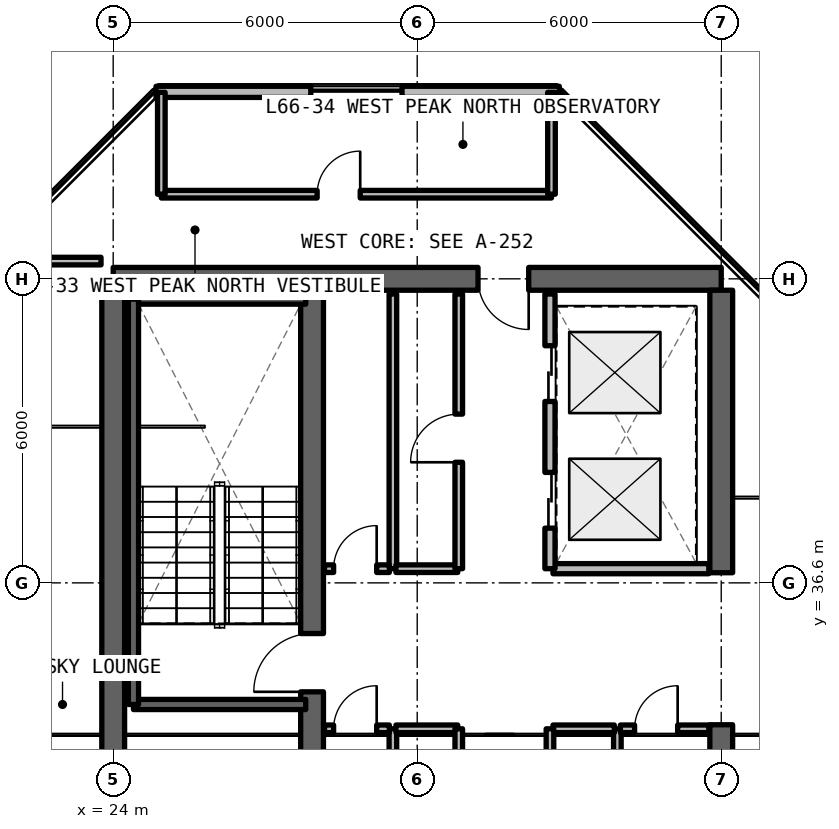
"""IFC4 building model, lengths in metres.
Left out: names, types, materials, properties, quantities, classifications, styles, units other than length and angle.
Written with IfcOpenShell. Run it as: python <this file> out.ifc"""

import sys

from ifc_helpers import new_model, si_unit, direction, frame, frame_2d, origin, place, context, subcontext, project, spatial, rectangle, extrude, element, fill, save


model = new_model("IFC4")
c1 = context("Model", 3, precision=1e-05, world=origin(), true_north=direction((0.0, 1.0)))
c2 = subcontext(c1, "Body", "Model", "MODEL_VIEW")
j1 = project(units=[si_unit("LENGTHUNIT", "METRE"), si_unit("PLANEANGLEUNIT", "RADIAN")], contexts=[c1])
p1 = place(None, origin())
s1 = spatial("IfcSite", under=j1, at=p1, CompositionType="ELEMENT")
p2 = place(p1, origin())
s2 = spatial("IfcBuilding", under=s1, at=p2, CompositionType="ELEMENT")
p3 = place(p2, frame((0.0, 0.0, 235.95)))
s3 = spatial("IfcBuildingStorey", under=s2, at=p3, CompositionType="ELEMENT", Elevation=235.95)
p4 = place(p3, frame((36.0, 42.6, 0.0), z_axis=(0.0, 0.0, 1.0), x_axis=(-1.0, 0.0, 0.0)))
e1 = element("IfcWall", 1, at=p4, inside=s3, PredefinedType="SHEAR", context=c2, shape_type="SweptSolid", body=[
    extrude(rectangle(XDim=12.0, YDim=0.45, at=frame_2d((6.0, 0.0))), origin(), (0.0, 0.0, 1.0), 3.3),
])
p5 = place(p4, frame((3.8, 0.0, 0.0)))
e2 = element("IfcOpeningElement", 2, at=p5, cuts=e1, PredefinedType="OPENING", context=c2, shape_type="SweptSolid", body=[
    extrude(rectangle(XDim=1.0, YDim=2.15, at=frame_2d((0.5, 1.075))), frame((0.0, 0.235, 0.0), z_axis=(0.0, -1.0, 0.0), x_axis=(1.0, 0.0, 0.0)), (0.0, 0.0, 1.0), 0.47),
])
p6 = place(p3, frame((24.0, 24.825, 0.0), z_axis=(0.0, 0.0, 1.0), x_axis=(0.0, 1.0, 0.0)))
e3 = element("IfcWall", 3, at=p6, inside=s3, PredefinedType="SHEAR", context=c2, shape_type="SweptSolid", body=[
    extrude(rectangle(XDim=17.55, YDim=0.45, at=frame_2d((8.775, 0.0))), origin(), (0.0, 0.0, 1.0), 3.3),
])
p7 = place(p3, frame((36.0, 24.825, 0.0), z_axis=(0.0, 0.0, 1.0), x_axis=(0.0, 1.0, 0.0)))
e4 = element("IfcWall", 4, at=p7, inside=s3, PredefinedType="SHEAR", context=c2, shape_type="SweptSolid", body=[
    extrude(rectangle(XDim=8.975, YDim=0.45, at=frame_2d((4.488, 0.0))), origin(), (0.0, 0.0, 1.0), 3.3),
])
p8 = place(p3, frame((36.0, 36.8, 0.0), z_axis=(0.0, 0.0, 1.0), x_axis=(0.0, 1.0, 0.0)))
e5 = element("IfcWall", 5, at=p8, inside=s3, PredefinedType="SHEAR", context=c2, shape_type="SweptSolid", body=[
    extrude(rectangle(XDim=5.575, YDim=0.45, at=frame_2d((2.788, 0.0))), origin(), (0.0, 0.0, 1.0), 3.3),
])
p9 = place(p3, frame((27.925, 24.825, 0.0), z_axis=(0.0, 0.0, 1.0), x_axis=(0.0, 1.0, 0.0)))
e6 = element("IfcWall", 6, at=p9, inside=s3, PredefinedType="SHEAR", context=c2, shape_type="SweptSolid", body=[
    extrude(rectangle(XDim=17.55, YDim=0.45, at=frame_2d((8.775, 0.0))), origin(), (0.0, 0.0, 1.0), 3.3),
])
p10 = place(p9, frame((0.425, 0.0, 0.0)))
e7 = element("IfcOpeningElement", 7, at=p10, cuts=e6, PredefinedType="OPENING", context=c2, shape_type="SweptSolid", body=[
    extrude(rectangle(XDim=1.15, YDim=2.15, at=frame_2d((0.575, 1.075))), frame((0.0, 0.235, 0.0), z_axis=(0.0, -1.0, 0.0), x_axis=(1.0, 0.0, 0.0)), (0.0, 0.0, 1.0), 0.47),
])
p11 = place(p9, frame((9.625, 0.0, 0.0)))
e8 = element("IfcOpeningElement", 8, at=p11, cuts=e6, PredefinedType="OPENING", context=c2, shape_type="SweptSolid", body=[
    extrude(rectangle(XDim=1.15, YDim=2.15, at=frame_2d((0.575, 1.075))), frame((0.0, 0.235, 0.0), z_axis=(0.0, -1.0, 0.0), x_axis=(1.0, 0.0, 0.0)), (0.0, 0.0, 1.0), 0.47),
])
p12 = place(p3, frame((32.804, 46.29, 0.0), z_axis=(0.0, 0.0, 1.0), x_axis=(-1.0, 0.0, 0.0)))
e9 = element("IfcWall", 9, at=p12, inside=s3, PredefinedType="SOLIDWALL", context=c2, shape_type="SweptSolid", body=[
    extrude(rectangle(XDim=7.959, YDim=0.22, at=frame_2d((3.979, 0.0))), origin(), (0.0, 0.0, 1.0), 3.08),
])
p13 = place(p12, frame((3.104, 0.0, 0.78)))
e10 = element("IfcOpeningElement", 10, at=p13, cuts=e9, PredefinedType="OPENING", context=c2, shape_type="SweptSolid", body=[
    extrude(rectangle(XDim=1.8, YDim=1.66, at=frame_2d((0.9, 0.83))), frame((0.0, 0.12, 0.0), z_axis=(0.0, -1.0, 0.0), x_axis=(1.0, 0.0, 0.0)), (0.0, 0.0, 1.0), 0.24),
])
p14 = place(p3, frame((29.52, 28.5, 0.0), z_axis=(0.0, 0.0, 1.0), x_axis=(0.0, 1.0, 0.0)))
e11 = element("IfcWall", 11, at=p14, inside=s3, PredefinedType="SOLIDWALL", context=c2, shape_type="SweptSolid", body=[
    extrude(rectangle(XDim=5.22, YDim=0.15, at=frame_2d((2.61, 0.0))), origin(), (0.0, 0.0, 1.0), 2.35),
])
p15 = place(p3, frame((28.17, 33.72, 0.0), z_axis=(0.0, 0.0, 1.0), x_axis=(1.0, 0.0, 0.0)))
e12 = element("IfcWall", 12, at=p15, inside=s3, PredefinedType="SOLIDWALL", context=c2, shape_type="SweptSolid", body=[
    extrude(rectangle(XDim=1.28, YDim=0.15, at=frame_2d((0.64, 0.0))), origin(), (0.0, 0.0, 1.0), 2.35),
])
p16 = place(p15, frame((0.18, 0.0, 0.0)))
e13 = element("IfcOpeningElement", 13, at=p16, cuts=e12, PredefinedType="OPENING", context=c2, shape_type="SweptSolid", body=[
    extrude(rectangle(XDim=0.85, YDim=2.1, at=frame_2d((0.425, 1.05))), frame((0.0, 0.085, 0.0), z_axis=(0.0, -1.0, 0.0), x_axis=(1.0, 0.0, 0.0)), (0.0, 0.0, 1.0), 0.17),
])
p17 = place(p3, frame((29.58, 33.72, 0.0), z_axis=(0.0, 0.0, 1.0), x_axis=(1.0, 0.0, 0.0)))
e14 = element("IfcWall", 14, at=p17, inside=s3, PredefinedType="SOLIDWALL", context=c2, shape_type="SweptSolid", body=[
    extrude(rectangle(XDim=1.22, YDim=0.15, at=frame_2d((0.61, 0.0))), origin(), (0.0, 0.0, 1.0), 2.35),
])
p18 = place(p3, frame((30.82, 28.5, 0.0), z_axis=(0.0, 0.0, 1.0), x_axis=(0.0, 1.0, 0.0)))
e15 = element("IfcWall", 15, at=p18, inside=s3, PredefinedType="SOLIDWALL", context=c2, shape_type="SweptSolid", body=[
    extrude(rectangle(XDim=5.22, YDim=0.15, at=frame_2d((2.61, 0.0))), origin(), (0.0, 0.0, 1.0), 2.35),
])
p19 = place(p18, frame((2.0, 0.0, 0.0)))
e16 = element("IfcOpeningElement", 16, at=p19, cuts=e15, PredefinedType="OPENING", context=c2, shape_type="SweptSolid", body=[
    extrude(rectangle(XDim=0.95, YDim=2.15, at=frame_2d((0.475, 1.075))), frame((0.0, 0.085, 0.0), z_axis=(0.0, -1.0, 0.0), x_axis=(1.0, 0.0, 0.0)), (0.0, 0.0, 1.0), 0.17),
])
p20 = place(p3, frame((33.95, 28.5, 0.0), z_axis=(0.0, 0.0, 1.0), x_axis=(0.0, 1.0, 0.0)))
e17 = element("IfcWall", 17, at=p20, inside=s3, PredefinedType="SOLIDWALL", context=c2, shape_type="SweptSolid", body=[
    extrude(rectangle(XDim=5.22, YDim=0.15, at=frame_2d((2.61, 0.0))), origin(), (0.0, 0.0, 1.0), 2.35),
])
p21 = place(p3, frame((32.68, 33.72, 0.0), z_axis=(0.0, 0.0, 1.0), x_axis=(1.0, 0.0, 0.0)))
e18 = element("IfcWall", 18, at=p21, inside=s3, PredefinedType="SOLIDWALL", context=c2, shape_type="SweptSolid", body=[
    extrude(rectangle(XDim=1.21, YDim=0.15, at=frame_2d((0.605, 0.0))), origin(), (0.0, 0.0, 1.0), 2.35),
])
p22 = place(p3, frame((34.01, 33.72, 0.0), z_axis=(0.0, 0.0, 1.0), x_axis=(1.0, 0.0, 0.0)))
e19 = element("IfcWall", 19, at=p22, inside=s3, PredefinedType="SOLIDWALL", context=c2, shape_type="SweptSolid", body=[
    extrude(rectangle(XDim=1.745, YDim=0.15, at=frame_2d((0.873, 0.0))), origin(), (0.0, 0.0, 1.0), 2.35),
])
p23 = place(p22, frame((0.28, 0.0, 0.0)))
e20 = element("IfcOpeningElement", 20, at=p23, cuts=e19, PredefinedType="OPENING", context=c2, shape_type="SweptSolid", body=[
    extrude(rectangle(XDim=0.85, YDim=2.1, at=frame_2d((0.425, 1.05))), frame((0.0, 0.085, 0.0), z_axis=(0.0, -1.0, 0.0), x_axis=(1.0, 0.0, 0.0)), (0.0, 0.0, 1.0), 0.17),
])
p24 = place(p3, frame((32.62, 28.5, 0.0), z_axis=(0.0, 0.0, 1.0), x_axis=(0.0, 1.0, 0.0)))
e21 = element("IfcWall", 21, at=p24, inside=s3, PredefinedType="SOLIDWALL", context=c2, shape_type="SweptSolid", body=[
    extrude(rectangle(XDim=5.22, YDim=0.15, at=frame_2d((2.61, 0.0))), origin(), (0.0, 0.0, 1.0), 2.35),
])
p25 = place(p24, frame((2.0, 0.0, 0.0)))
e22 = element("IfcOpeningElement", 22, at=p25, cuts=e21, PredefinedType="OPENING", context=c2, shape_type="SweptSolid", body=[
    extrude(rectangle(XDim=0.95, YDim=2.15, at=frame_2d((0.475, 1.075))), frame((0.0, 0.085, 0.0), z_axis=(0.0, -1.0, 0.0), x_axis=(1.0, 0.0, 0.0)), (0.0, 0.0, 1.0), 0.17),
])
p26 = place(p3, frame((29.52, 36.88, 0.0), z_axis=(0.0, 0.0, 1.0), x_axis=(0.0, 1.0, 0.0)))
e23 = element("IfcWall", 23, at=p26, inside=s3, PredefinedType="SOLIDWALL", context=c2, shape_type="SweptSolid", body=[
    extrude(rectangle(XDim=5.42, YDim=0.15, at=frame_2d((2.71, 0.0))), origin(), (0.0, 0.0, 1.0), 2.35),
])
p27 = place(p3, frame((28.17, 36.88, 0.0), z_axis=(0.0, 0.0, 1.0), x_axis=(1.0, 0.0, 0.0)))
e24 = element("IfcWall", 24, at=p27, inside=s3, PredefinedType="SOLIDWALL", context=c2, shape_type="SweptSolid", body=[
    extrude(rectangle(XDim=1.28, YDim=0.15, at=frame_2d((0.64, 0.0))), origin(), (0.0, 0.0, 1.0), 2.35),
])
p28 = place(p27, frame((0.18, 0.0, 0.0)))
e25 = element("IfcOpeningElement", 25, at=p28, cuts=e24, PredefinedType="OPENING", context=c2, shape_type="SweptSolid", body=[
    extrude(rectangle(XDim=0.85, YDim=2.1, at=frame_2d((0.425, 1.05))), frame((0.0, 0.085, 0.0), z_axis=(0.0, -1.0, 0.0), x_axis=(1.0, 0.0, 0.0)), (0.0, 0.0, 1.0), 0.17),
])
p29 = place(p3, frame((29.58, 36.88, 0.0), z_axis=(0.0, 0.0, 1.0), x_axis=(1.0, 0.0, 0.0)))
e26 = element("IfcWall", 26, at=p29, inside=s3, PredefinedType="SOLIDWALL", context=c2, shape_type="SweptSolid", body=[
    extrude(rectangle(XDim=1.22, YDim=0.15, at=frame_2d((0.61, 0.0))), origin(), (0.0, 0.0, 1.0), 2.35),
])
p30 = place(p3, frame((30.82, 36.88, 0.0), z_axis=(0.0, 0.0, 1.0), x_axis=(0.0, 1.0, 0.0)))
e27 = element("IfcWall", 27, at=p30, inside=s3, PredefinedType="SOLIDWALL", context=c2, shape_type="SweptSolid", body=[
    extrude(rectangle(XDim=5.42, YDim=0.15, at=frame_2d((2.71, 0.0))), origin(), (0.0, 0.0, 1.0), 2.35),
])
p31 = place(p30, frame((2.1, 0.0, 0.0)))
e28 = element("IfcOpeningElement", 28, at=p31, cuts=e27, PredefinedType="OPENING", context=c2, shape_type="SweptSolid", body=[
    extrude(rectangle(XDim=0.95, YDim=2.15, at=frame_2d((0.475, 1.075))), frame((0.0, 0.085, 0.0), z_axis=(0.0, -1.0, 0.0), x_axis=(1.0, 0.0, 0.0)), (0.0, 0.0, 1.0), 0.17),
])
p32 = place(p3, frame((32.68, 36.88, 0.0), z_axis=(0.0, 0.0, 1.0), x_axis=(1.0, 0.0, 0.0)))
e29 = element("IfcWall", 29, at=p32, inside=s3, PredefinedType="SOLIDWALL", context=c2, shape_type="SweptSolid", body=[
    extrude(rectangle(XDim=3.075, YDim=0.2, at=frame_2d((1.538, 0.0))), origin(), (0.0, 0.0, 1.0), 2.35),
])
p33 = place(p3, frame((32.62, 36.88, 0.0), z_axis=(0.0, 0.0, 1.0), x_axis=(0.0, 1.0, 0.0)))
e30 = element("IfcWall", 30, at=p33, inside=s3, PredefinedType="SOLIDWALL", context=c2, shape_type="SweptSolid", body=[
    extrude(rectangle(XDim=5.42, YDim=0.2, at=frame_2d((2.71, 0.0))), origin(), (0.0, 0.0, 1.0), 2.35),
])
p34 = place(p33, frame((0.8, 0.0, 0.0)))
e31 = element("IfcOpeningElement", 31, at=p34, cuts=e30, PredefinedType="OPENING", context=c2, shape_type="SweptSolid", body=[
    extrude(rectangle(XDim=1.1, YDim=2.2, at=frame_2d((0.55, 1.1))), frame((0.0, 0.11, 0.0), z_axis=(0.0, -1.0, 0.0), x_axis=(1.0, 0.0, 0.0)), (0.0, 0.0, 1.0), 0.22),
])
p35 = place(p33, frame((3.3, 0.0, 0.0)))
e32 = element("IfcOpeningElement", 32, at=p35, cuts=e30, PredefinedType="OPENING", context=c2, shape_type="SweptSolid", body=[
    extrude(rectangle(XDim=1.1, YDim=2.2, at=frame_2d((0.55, 1.1))), frame((0.0, 0.11, 0.0), z_axis=(0.0, -1.0, 0.0), x_axis=(1.0, 0.0, 0.0)), (0.0, 0.0, 1.0), 0.22),
])
p36 = place(p3, frame((22.12, 42.95, 0.0), z_axis=(0.0, 0.0, 1.0), x_axis=(1.0, 0.0, 0.0)))
e33 = element("IfcWall", 33, at=p36, inside=s3, PredefinedType="SOLIDWALL", context=c2, shape_type="SweptSolid", body=[
    extrude(rectangle(XDim=1.64, YDim=0.15, at=frame_2d((0.82, 0.0))), origin(), (0.0, 0.0, 1.0), 2.35),
])
p37 = place(p3, frame((24.95, 44.27, 0.0), z_axis=(0.0, 0.0, 1.0), x_axis=(1.0, 0.0, 0.0)))
e34 = element("IfcWall", 34, at=p37, inside=s3, PredefinedType="SOLIDWALL", context=c2, shape_type="SweptSolid", body=[
    extrude(rectangle(XDim=7.7, YDim=0.15, at=frame_2d((3.85, 0.0))), origin(), (0.0, 0.0, 1.0), 2.35),
])
p38 = place(p37, frame((3.075, 0.0, 0.0)))
e35 = element("IfcOpeningElement", 35, at=p38, cuts=e34, PredefinedType="OPENING", context=c2, shape_type="SweptSolid", body=[
    extrude(rectangle(XDim=0.85, YDim=2.1, at=frame_2d((0.425, 1.05))), frame((0.0, 0.085, 0.0), z_axis=(0.0, -1.0, 0.0), x_axis=(1.0, 0.0, 0.0)), (0.0, 0.0, 1.0), 0.17),
])
for number, where, z_axis, x_axis in (
    (36, (24.95, 44.27, 0.0), (0.0, 0.0, 1.0), (0.0, 1.0, 0.0)),
    (37, (32.65, 44.27, 0.0), (0.0, 0.0, 1.0), (0.0, 1.0, 0.0)),
):
    element("IfcWall", number, at=place(p3, frame(where, z_axis=z_axis, x_axis=x_axis)), inside=s3, PredefinedType="SOLIDWALL", context=c2, shape_type="SweptSolid", body=[
        extrude(rectangle(XDim=2.01, YDim=0.15, at=frame_2d((1.005, 0.0))), origin(), (0.0, 0.0, 1.0), 2.35),
    ])
for number, where, z_axis, x_axis in (
    (38, (24.4, 34.2, 0.0), (0.0, 0.0, 1.0), (1.0, 0.0, 0.0)),
    (39, (27.8, 42.2, 0.0), (0.0, 0.0, 1.0), (-1.0, 0.0, 0.0)),
):
    element("IfcWall", number, at=place(p3, frame(where, z_axis=z_axis, x_axis=x_axis)), inside=s3, PredefinedType="SOLIDWALL", context=c2, shape_type="SweptSolid", body=[
        extrude(rectangle(XDim=3.4, YDim=0.2, at=frame_2d((1.7, 0.0))), origin(), (0.0, 0.0, 1.0), 3.3),
    ])
p39 = place(p3, frame((24.4, 42.2, 0.0), z_axis=(0.0, 0.0, 1.0), x_axis=(0.0, -1.0, 0.0)))
e40 = element("IfcWall", 40, at=p39, inside=s3, PredefinedType="SOLIDWALL", context=c2, shape_type="SweptSolid", body=[
    extrude(rectangle(XDim=8.0, YDim=0.2, at=frame_2d((4.0, 0.0))), origin(), (0.0, 0.0, 1.0), 3.3),
])
p40 = place(p13, origin())
e41 = element("IfcWindow", 41, at=p40, inside=s3, PartitioningType="SINGLE_PANEL", PredefinedType="WINDOW", context=c2, shape_type="SweptSolid", body=[
    extrude(rectangle(XDim=1.8, YDim=1.66, at=frame_2d((0.9, 0.83))), frame((0.0, 0.03, 0.0), z_axis=(0.0, -1.0, 0.0), x_axis=(1.0, 0.0, 0.0)), (0.0, 0.0, 1.0), 0.06),
])
fill(e10, e41)
p41 = place(p16, origin())
e42 = element("IfcDoor", 42, at=p41, inside=s3, OperationType="SINGLE_SWING_RIGHT", PredefinedType="DOOR", context=c2, shape_type="SweptSolid", body=[
    extrude(rectangle(XDim=0.85, YDim=2.1, at=frame_2d((0.425, 1.05))), frame((0.0, 0.025, 0.0), z_axis=(0.0, -1.0, 0.0), x_axis=(1.0, 0.0, 0.0)), (0.0, 0.0, 1.0), 0.05),
])
fill(e13, e42)
p42 = place(p23, origin())
e43 = element("IfcDoor", 43, at=p42, inside=s3, OperationType="SINGLE_SWING_RIGHT", PredefinedType="DOOR", context=c2, shape_type="SweptSolid", body=[
    extrude(rectangle(XDim=0.85, YDim=2.1, at=frame_2d((0.425, 1.05))), frame((0.0, 0.025, 0.0), z_axis=(0.0, -1.0, 0.0), x_axis=(1.0, 0.0, 0.0)), (0.0, 0.0, 1.0), 0.05),
])
fill(e20, e43)
p43 = place(p28, origin())
e44 = element("IfcDoor", 44, at=p43, inside=s3, OperationType="SINGLE_SWING_RIGHT", PredefinedType="DOOR", context=c2, shape_type="SweptSolid", body=[
    extrude(rectangle(XDim=0.85, YDim=2.1, at=frame_2d((0.425, 1.05))), frame((0.0, 0.025, 0.0), z_axis=(0.0, -1.0, 0.0), x_axis=(1.0, 0.0, 0.0)), (0.0, 0.0, 1.0), 0.05),
])
fill(e25, e44)
p44 = place(p31, origin())
e45 = element("IfcDoor", 45, at=p44, inside=s3, OperationType="SINGLE_SWING_LEFT", PredefinedType="DOOR", context=c2, shape_type="SweptSolid", body=[
    extrude(rectangle(XDim=0.95, YDim=2.15, at=frame_2d((0.475, 1.075))), frame((0.0, 0.025, 0.0), z_axis=(0.0, -1.0, 0.0), x_axis=(1.0, 0.0, 0.0)), (0.0, 0.0, 1.0), 0.05),
])
fill(e28, e45)
p45 = place(p34, origin())
e46 = element("IfcDoor", 46, at=p45, inside=s3, OperationType="SLIDING_TO_LEFT", PredefinedType="DOOR", context=c2, shape_type="SweptSolid", body=[
    extrude(rectangle(XDim=1.1, YDim=2.2, at=frame_2d((0.55, 1.1))), frame((0.0, 0.025, 0.0), z_axis=(0.0, -1.0, 0.0), x_axis=(1.0, 0.0, 0.0)), (0.0, 0.0, 1.0), 0.05),
])
fill(e31, e46)
p46 = place(p35, origin())
e47 = element("IfcDoor", 47, at=p46, inside=s3, OperationType="SLIDING_TO_RIGHT", PredefinedType="DOOR", context=c2, shape_type="SweptSolid", body=[
    extrude(rectangle(XDim=1.1, YDim=2.2, at=frame_2d((0.55, 1.1))), frame((0.0, 0.025, 0.0), z_axis=(0.0, -1.0, 0.0), x_axis=(1.0, 0.0, 0.0)), (0.0, 0.0, 1.0), 0.05),
])
fill(e32, e47)
p47 = place(p38, origin())
e48 = element("IfcDoor", 48, at=p47, inside=s3, OperationType="SINGLE_SWING_RIGHT", PredefinedType="DOOR", context=c2, shape_type="SweptSolid", body=[
    extrude(rectangle(XDim=0.85, YDim=2.1, at=frame_2d((0.425, 1.05))), frame((0.0, 0.025, 0.0), z_axis=(0.0, -1.0, 0.0), x_axis=(1.0, 0.0, 0.0)), (0.0, 0.0, 1.0), 0.05),
])
fill(e35, e48)
p48 = place(p11, origin())
e49 = element("IfcDoor", 49, at=p48, inside=s3, OperationType="SINGLE_SWING_RIGHT", PredefinedType="DOOR", context=c2, shape_type="SweptSolid", body=[
    extrude(rectangle(XDim=1.15, YDim=2.15, at=frame_2d((0.575, 1.075))), frame((0.0, 0.025, 0.0), z_axis=(0.0, -1.0, 0.0), x_axis=(1.0, 0.0, 0.0)), (0.0, 0.0, 1.0), 0.05),
])
fill(e8, e49)
p49 = place(p5, origin())
e50 = element("IfcDoor", 50, at=p49, inside=s3, OperationType="SINGLE_SWING_RIGHT", PredefinedType="DOOR", context=c2, shape_type="SweptSolid", body=[
    extrude(rectangle(XDim=1.0, YDim=2.15, at=frame_2d((0.5, 1.075))), frame((0.0, 0.025, 0.0), z_axis=(0.0, -1.0, 0.0), x_axis=(1.0, 0.0, 0.0)), (0.0, 0.0, 1.0), 0.05),
])
fill(e2, e50)
save(model, sys.argv[1])
